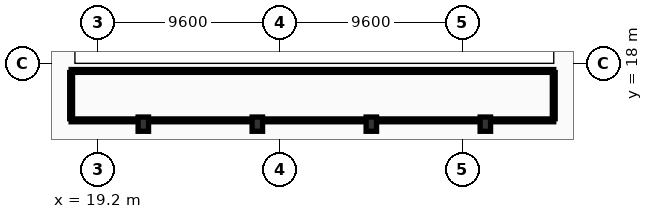
"""IFC4 building model, lengths in metres.
Left out: names, types, materials, properties, quantities, classifications, styles, units other than length and angle.
Written with IfcOpenShell. Run it as: python <this file> out.ifc"""

import sys

from ifc_helpers import new_model, si_unit, direction, frame, frame_2d, origin, origin_2d, place, context, subcontext, project, spatial, rectangle, extrude, element, fill, save


model = new_model("IFC4")
c1 = context("Model", 3, precision=1e-05, world=origin(), true_north=direction((0.0, 1.0)))
c2 = subcontext(c1, "Body", "Model", "MODEL_VIEW")
j1 = project(units=[si_unit("LENGTHUNIT", "METRE"), si_unit("PLANEANGLEUNIT", "RADIAN")], contexts=[c1])
p1 = place(None, origin())
s1 = spatial("IfcSite", under=j1, at=p1, CompositionType="ELEMENT")
p2 = place(p1, origin())
s2 = spatial("IfcBuilding", under=s1, at=p2, CompositionType="ELEMENT")
p3 = place(p2, frame((0.0, 0.0, 5.4)))
s3 = spatial("IfcBuildingStorey", under=s2, at=p3, CompositionType="ELEMENT", Elevation=5.4)
for number, where, z_axis, x_axis in (
    (1, (21.6, 14.8, 0.0), (0.0, 0.0, 1.0), (1.0, 0.0, 0.0)),
    (2, (27.6, 14.8, 0.0), (0.0, 0.0, 1.0), (1.0, 0.0, 0.0)),
    (3, (33.6, 14.8, 0.0), (0.0, 0.0, 1.0), (1.0, 0.0, 0.0)),
    (4, (39.6, 14.8, 0.0), (0.0, 0.0, 1.0), (1.0, 0.0, 0.0)),
):
    element("IfcColumn", number, at=place(p3, frame(where, z_axis=z_axis, x_axis=x_axis)), inside=s3, PredefinedType="COLUMN", context=c2, shape_type="SweptSolid", body=[
        extrude(rectangle(XDim=0.55, YDim=0.75, at=origin_2d()), origin(), (0.0, 0.0, 1.0), 4.5),
    ])
p4 = place(p3, frame((17.8, 17.6, 0.0), z_axis=(0.0, 0.0, 1.0), x_axis=(1.0, 0.0, 0.0)))
e5 = element("IfcWall", 5, at=p4, inside=s3, PredefinedType="PARTITIONING", context=c2, shape_type="SweptSolid", body=[
    extrude(rectangle(XDim=25.4, YDim=0.15, at=frame_2d((12.7, 0.0))), origin(), (0.0, 0.0, 1.0), 4.225),
])
p5 = place(p3, frame((43.2, 15.0, 0.0), z_axis=(0.0, 0.0, 1.0), x_axis=(-1.0, 0.0, 0.0)))
e6 = element("IfcWall", 6, at=p5, inside=s3, PredefinedType="PARTITIONING", context=c2, shape_type="SweptSolid", body=[
    extrude(rectangle(XDim=25.4, YDim=0.15, at=frame_2d((12.7, 0.0))), origin(), (0.0, 0.0, 1.0), 3.53),
])
p6 = place(p3, frame((17.8, 15.085, 0.0), z_axis=(0.0, 0.0, 1.0), x_axis=(0.0, 1.0, 0.0)))
e7 = element("IfcWall", 7, at=p6, inside=s3, PredefinedType="PARTITIONING", context=c2, shape_type="SweptSolid", body=[
    extrude(rectangle(XDim=2.43, YDim=0.15, at=frame_2d((1.215, 0.0))), origin(), (0.0, 0.0, 1.0), 3.53),
])
p7 = place(p6, frame((0.465, 0.0, 0.0)))
e8 = element("IfcOpeningElement", 8, at=p7, cuts=e7, PredefinedType="OPENING", context=c2, shape_type="SweptSolid", body=[
    extrude(rectangle(XDim=1.5, YDim=2.35, at=frame_2d((0.75, 1.175))), frame((0.0, 0.085, 0.0), z_axis=(0.0, -1.0, 0.0), x_axis=(1.0, 0.0, 0.0)), (0.0, 0.0, 1.0), 0.17),
])
p8 = place(p3, frame((43.2, 17.515, 0.0), z_axis=(0.0, 0.0, 1.0), x_axis=(0.0, -1.0, 0.0)))
e9 = element("IfcWall", 9, at=p8, inside=s3, PredefinedType="PARTITIONING", context=c2, shape_type="SweptSolid", body=[
    extrude(rectangle(XDim=2.43, YDim=0.15, at=frame_2d((1.215, 0.0))), origin(), (0.0, 0.0, 1.0), 3.57),
])
p9 = place(p7, origin())
e10 = element("IfcDoor", 10, at=p9, inside=s3, OperationType="DOUBLE_DOOR_SINGLE_SWING", PredefinedType="DOOR", context=c2, shape_type="SweptSolid", body=[
    extrude(rectangle(XDim=1.5, YDim=2.35, at=frame_2d((0.75, 1.175))), frame((0.0, 0.025, 0.0), z_axis=(0.0, -1.0, 0.0), x_axis=(1.0, 0.0, 0.0)), (0.0, 0.0, 1.0), 0.05),
])
fill(e8, e10)
save(model, sys.argv[1])
